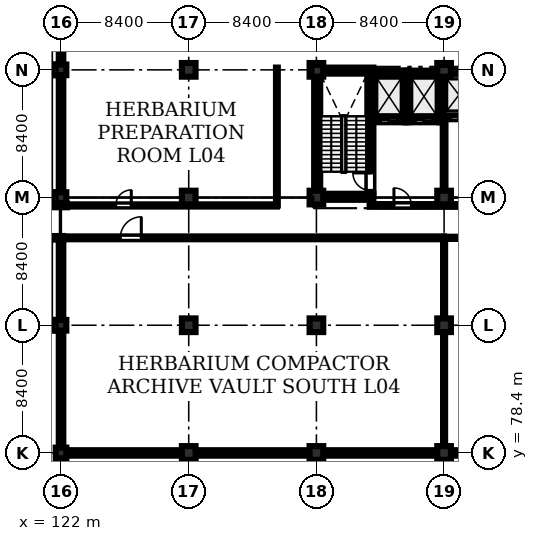
"""IFC4 building model, lengths in metres.
Left out: names, types, materials, properties, quantities, classifications, styles, units other than length and angle.
Written with IfcOpenShell. Run it as: python <this file> out.ifc"""

import sys

from ifc_helpers import new_model, si_unit, direction, frame, frame_2d, origin, origin_2d, place, context, subcontext, project, spatial, rectangle, extrude, element, fill, save


model = new_model("IFC4")
c1 = context("Model", 3, precision=1e-05, world=origin(), true_north=direction((0.0, 1.0)))
c2 = subcontext(c1, "Body", "Model", "MODEL_VIEW")
j1 = project(units=[si_unit("LENGTHUNIT", "METRE"), si_unit("PLANEANGLEUNIT", "RADIAN")], contexts=[c1])
p1 = place(None, origin())
s1 = spatial("IfcSite", under=j1, at=p1, CompositionType="ELEMENT")
p2 = place(p1, origin())
s2 = spatial("IfcBuilding", under=s1, at=p2, CompositionType="ELEMENT")
p3 = place(p2, frame((0.0, 0.0, 14.7)))
s3 = spatial("IfcBuildingStorey", under=s2, at=p3, CompositionType="ELEMENT", Elevation=14.7)
for number, where, z_axis, x_axis in (
    (1, (121.15, 86.8, 0.0), (0.0, 0.0, 1.0), (1.0, 0.0, 0.0)),
    (2, (121.15, 95.2, 0.0), (0.0, 0.0, 1.0), (1.0, 0.0, 0.0)),
    (3, (121.15, 103.6, 0.0), (0.0, 0.0, 1.0), (1.0, 0.0, 0.0)),
):
    element("IfcColumn", number, at=place(p3, frame(where, z_axis=z_axis, x_axis=x_axis)), inside=s3, PredefinedType="COLUMN", context=c2, shape_type="SweptSolid", body=[
        extrude(rectangle(XDim=0.7, YDim=0.7, at=origin_2d()), origin(), (0.0, 0.0, 1.0), 4.5),
    ])
for number, where, z_axis, x_axis in (
    (4, (122.0, 78.4, 0.0), (0.0, 0.0, 1.0), (1.0, 0.0, 0.0)),
    (5, (122.0, 86.8, 0.0), (0.0, 0.0, 1.0), (1.0, 0.0, 0.0)),
    (6, (122.0, 95.2, 0.0), (0.0, 0.0, 1.0), (1.0, 0.0, 0.0)),
    (7, (122.0, 103.6, 0.0), (0.0, 0.0, 1.0), (1.0, 0.0, 0.0)),
):
    element("IfcColumn", number, at=place(p3, frame(where, z_axis=z_axis, x_axis=x_axis)), inside=s3, PredefinedType="COLUMN", context=c2, shape_type="SweptSolid", body=[
        extrude(rectangle(XDim=0.7, YDim=0.7, at=origin_2d()), origin(), (0.0, 0.0, 1.0), 4.26),
    ])
for number, where, z_axis, x_axis in (
    (8, (130.4, 78.4, 0.0), (0.0, 0.0, 1.0), (1.0, 0.0, 0.0)),
    (9, (130.4, 86.8, 0.0), (0.0, 0.0, 1.0), (1.0, 0.0, 0.0)),
    (10, (130.4, 95.2, 0.0), (0.0, 0.0, 1.0), (1.0, 0.0, 0.0)),
    (11, (130.4, 103.6, 0.0), (0.0, 0.0, 1.0), (1.0, 0.0, 0.0)),
    (12, (138.8, 78.4, 0.0), (0.0, 0.0, 1.0), (1.0, 0.0, 0.0)),
    (13, (138.8, 86.8, 0.0), (0.0, 0.0, 1.0), (1.0, 0.0, 0.0)),
    (14, (138.8, 95.2, 0.0), (0.0, 0.0, 1.0), (1.0, 0.0, 0.0)),
    (15, (138.8, 103.6, 0.0), (0.0, 0.0, 1.0), (1.0, 0.0, 0.0)),
    (16, (147.2, 78.4, 0.0), (0.0, 0.0, 1.0), (1.0, 0.0, 0.0)),
    (17, (147.2, 86.8, 0.0), (0.0, 0.0, 1.0), (1.0, 0.0, 0.0)),
    (18, (147.2, 95.2, 0.0), (0.0, 0.0, 1.0), (1.0, 0.0, 0.0)),
    (19, (147.2, 103.6, 0.0), (0.0, 0.0, 1.0), (1.0, 0.0, 0.0)),
):
    element("IfcColumn", number, at=place(p3, frame(where, z_axis=z_axis, x_axis=x_axis)), inside=s3, PredefinedType="COLUMN", context=c2, shape_type="SweptSolid", body=[
        extrude(rectangle(XDim=0.9, YDim=0.9, at=origin_2d()), origin(), (0.0, 0.0, 1.0), 4.26),
    ])
for number, where, z_axis, x_axis in (
    (20, (138.65, 95.25, 0.0), (0.0, 0.0, 1.0), (1.0, 0.0, 0.0)),
    (21, (138.65, 103.55, 0.0), (0.0, 0.0, 1.0), (1.0, 0.0, 0.0)),
):
    element("IfcWall", number, at=place(p3, frame(where, z_axis=z_axis, x_axis=x_axis)), inside=s3, PredefinedType="SHEAR", context=c2, shape_type="SweptSolid", body=[
        extrude(rectangle(XDim=3.9, YDim=0.4, at=frame_2d((1.95, 0.0))), origin(), (0.0, 0.0, 1.0), 4.26),
    ])
p4 = place(p3, frame((138.85, 95.45, 0.0), z_axis=(0.0, 0.0, 1.0), x_axis=(0.0, 1.0, 0.0)))
e22 = element("IfcWall", 22, at=p4, inside=s3, PredefinedType="SHEAR", context=c2, shape_type="SweptSolid", body=[
    extrude(rectangle(XDim=7.9, YDim=0.4, at=frame_2d((3.95, 0.0))), origin(), (0.0, 0.0, 1.0), 4.26),
])
p5 = place(p3, frame((142.35, 95.45, 0.0), z_axis=(0.0, 0.0, 1.0), x_axis=(0.0, 1.0, 0.0)))
e23 = element("IfcWall", 23, at=p5, inside=s3, PredefinedType="SHEAR", context=c2, shape_type="SweptSolid", body=[
    extrude(rectangle(XDim=7.9, YDim=0.4, at=frame_2d((3.95, 0.0))), origin(), (0.0, 0.0, 1.0), 4.26),
])
p6 = place(p5, frame((0.22, 0.0, 0.0)))
e24 = element("IfcOpeningElement", 24, at=p6, cuts=e23, PredefinedType="OPENING", context=c2, shape_type="SweptSolid", body=[
    extrude(rectangle(XDim=1.15, YDim=2.15, at=frame_2d((0.575, 1.075))), frame((0.0, 0.21, 0.0), z_axis=(0.0, -1.0, 0.0), x_axis=(1.0, 0.0, 0.0)), (0.0, 0.0, 1.0), 0.42),
])
p7 = place(p3, frame((142.55, 100.275, 0.0), z_axis=(0.0, 0.0, 1.0), x_axis=(1.0, 0.0, 0.0)))
e25 = element("IfcWall", 25, at=p7, inside=s3, PredefinedType="SHEAR", context=c2, shape_type="SweptSolid", body=[
    extrude(rectangle(XDim=2.05, YDim=0.25, at=frame_2d((1.025, 0.0))), origin(), (0.0, 0.0, 1.0), 4.26),
])
p8 = place(p7, frame((0.475, 0.0, 0.0)))
e26 = element("IfcOpeningElement", 26, at=p8, cuts=e25, PredefinedType="OPENING", context=c2, shape_type="SweptSolid", body=[
    extrude(rectangle(XDim=1.1, YDim=2.15, at=frame_2d((0.55, 1.075))), frame((0.0, 0.135, 0.0), z_axis=(0.0, -1.0, 0.0), x_axis=(1.0, 0.0, 0.0)), (0.0, 0.0, 1.0), 0.27),
])
p9 = place(p3, frame((142.55, 103.425, 0.0), z_axis=(0.0, 0.0, 1.0), x_axis=(1.0, 0.0, 0.0)))
e27 = element("IfcWall", 27, at=p9, inside=s3, PredefinedType="SHEAR", context=c2, shape_type="SweptSolid", body=[
    extrude(rectangle(XDim=2.05, YDim=0.25, at=frame_2d((1.025, 0.0))), origin(), (0.0, 0.0, 1.0), 4.26),
])
p10 = place(p3, frame((144.725, 100.15, 0.0), z_axis=(0.0, 0.0, 1.0), x_axis=(0.0, 1.0, 0.0)))
e28 = element("IfcWall", 28, at=p10, inside=s3, PredefinedType="SHEAR", context=c2, shape_type="SweptSolid", body=[
    extrude(rectangle(XDim=3.4, YDim=0.25, at=frame_2d((1.7, 0.0))), origin(), (0.0, 0.0, 1.0), 4.26),
])
p11 = place(p3, frame((144.85, 100.275, 0.0), z_axis=(0.0, 0.0, 1.0), x_axis=(1.0, 0.0, 0.0)))
e29 = element("IfcWall", 29, at=p11, inside=s3, PredefinedType="SHEAR", context=c2, shape_type="SweptSolid", body=[
    extrude(rectangle(XDim=2.05, YDim=0.25, at=frame_2d((1.025, 0.0))), origin(), (0.0, 0.0, 1.0), 4.26),
])
p12 = place(p11, frame((0.465, 0.0, 0.0)))
e30 = element("IfcOpeningElement", 30, at=p12, cuts=e29, PredefinedType="OPENING", context=c2, shape_type="SweptSolid", body=[
    extrude(rectangle(XDim=1.12, YDim=2.15, at=frame_2d((0.56, 1.075))), frame((0.0, 0.135, 0.0), z_axis=(0.0, -1.0, 0.0), x_axis=(1.0, 0.0, 0.0)), (0.0, 0.0, 1.0), 0.27),
])
p13 = place(p3, frame((144.85, 103.425, 0.0), z_axis=(0.0, 0.0, 1.0), x_axis=(1.0, 0.0, 0.0)))
e31 = element("IfcWall", 31, at=p13, inside=s3, PredefinedType="SHEAR", context=c2, shape_type="SweptSolid", body=[
    extrude(rectangle(XDim=2.05, YDim=0.25, at=frame_2d((1.025, 0.0))), origin(), (0.0, 0.0, 1.0), 4.26),
])
p14 = place(p3, frame((147.025, 100.15, 0.0), z_axis=(0.0, 0.0, 1.0), x_axis=(0.0, 1.0, 0.0)))
e32 = element("IfcWall", 32, at=p14, inside=s3, PredefinedType="SHEAR", context=c2, shape_type="SweptSolid", body=[
    extrude(rectangle(XDim=3.4, YDim=0.25, at=frame_2d((1.7, 0.0))), origin(), (0.0, 0.0, 1.0), 4.26),
])
p15 = place(p3, frame((147.15, 100.475, 0.0), z_axis=(0.0, 0.0, 1.0), x_axis=(1.0, 0.0, 0.0)))
e33 = element("IfcWall", 33, at=p15, inside=s3, PredefinedType="SHEAR", context=c2, shape_type="SweptSolid", body=[
    extrude(rectangle(XDim=2.05, YDim=0.25, at=frame_2d((1.025, 0.0))), origin(), (0.0, 0.0, 1.0), 4.26),
])
p16 = place(p15, frame((0.495, 0.0, 0.0)))
e34 = element("IfcOpeningElement", 34, at=p16, cuts=e33, PredefinedType="OPENING", context=c2, shape_type="SweptSolid", body=[
    extrude(rectangle(XDim=1.06, YDim=2.15, at=frame_2d((0.53, 1.075))), frame((0.0, 0.135, 0.0), z_axis=(0.0, -1.0, 0.0), x_axis=(1.0, 0.0, 0.0)), (0.0, 0.0, 1.0), 0.27),
])
p17 = place(p3, frame((147.15, 103.425, 0.0), z_axis=(0.0, 0.0, 1.0), x_axis=(1.0, 0.0, 0.0)))
e35 = element("IfcWall", 35, at=p17, inside=s3, PredefinedType="SHEAR", context=c2, shape_type="SweptSolid", body=[
    extrude(rectangle(XDim=2.05, YDim=0.25, at=frame_2d((1.025, 0.0))), origin(), (0.0, 0.0, 1.0), 4.26),
])
p18 = place(p3, frame((129.95, 78.4, 0.0), z_axis=(0.0, 0.0, 1.0), x_axis=(-1.0, 0.0, 0.0)))
e36 = element("IfcWall", 36, at=p18, inside=s3, PredefinedType="STANDARD", context=c2, shape_type="SweptSolid", body=[
    extrude(rectangle(XDim=7.6, YDim=0.36, at=frame_2d((3.8, 0.0))), origin(), (0.0, 0.0, 1.0), 3.56),
])
p19 = place(p18, frame((1.15, 0.0, 0.95)))
e37 = element("IfcOpeningElement", 37, at=p19, cuts=e36, PredefinedType="OPENING", context=c2, shape_type="SweptSolid", body=[
    extrude(rectangle(XDim=1.5, YDim=1.5, at=frame_2d((0.75, 0.75))), frame((0.0, 0.19, 0.0), z_axis=(0.0, -1.0, 0.0), x_axis=(1.0, 0.0, 0.0)), (0.0, 0.0, 1.0), 0.38),
])
p20 = place(p3, frame((138.35, 78.4, 0.0), z_axis=(0.0, 0.0, 1.0), x_axis=(-1.0, 0.0, 0.0)))
e38 = element("IfcWall", 38, at=p20, inside=s3, PredefinedType="STANDARD", context=c2, shape_type="SweptSolid", body=[
    extrude(rectangle(XDim=7.5, YDim=0.36, at=frame_2d((3.75, 0.0))), origin(), (0.0, 0.0, 1.0), 3.56),
])
p21 = place(p20, frame((1.15, 0.0, 0.95)))
e39 = element("IfcOpeningElement", 39, at=p21, cuts=e38, PredefinedType="OPENING", context=c2, shape_type="SweptSolid", body=[
    extrude(rectangle(XDim=1.5, YDim=1.5, at=frame_2d((0.75, 0.75))), frame((0.0, 0.19, 0.0), z_axis=(0.0, -1.0, 0.0), x_axis=(1.0, 0.0, 0.0)), (0.0, 0.0, 1.0), 0.38),
])
p22 = place(p3, frame((146.75, 78.4, 0.0), z_axis=(0.0, 0.0, 1.0), x_axis=(-1.0, 0.0, 0.0)))
e40 = element("IfcWall", 40, at=p22, inside=s3, PredefinedType="STANDARD", context=c2, shape_type="SweptSolid", body=[
    extrude(rectangle(XDim=7.5, YDim=0.36, at=frame_2d((3.75, 0.0))), origin(), (0.0, 0.0, 1.0), 3.56),
])
p23 = place(p22, frame((1.15, 0.0, 0.95)))
e41 = element("IfcOpeningElement", 41, at=p23, cuts=e40, PredefinedType="OPENING", context=c2, shape_type="SweptSolid", body=[
    extrude(rectangle(XDim=1.5, YDim=1.5, at=frame_2d((0.75, 0.75))), frame((0.0, 0.19, 0.0), z_axis=(0.0, -1.0, 0.0), x_axis=(1.0, 0.0, 0.0)), (0.0, 0.0, 1.0), 0.38),
])
p24 = place(p3, frame((155.15, 78.4, 0.0), z_axis=(0.0, 0.0, 1.0), x_axis=(-1.0, 0.0, 0.0)))
e42 = element("IfcWall", 42, at=p24, inside=s3, PredefinedType="STANDARD", context=c2, shape_type="SweptSolid", body=[
    extrude(rectangle(XDim=7.5, YDim=0.36, at=frame_2d((3.75, 0.0))), origin(), (0.0, 0.0, 1.0), 3.56),
])
p25 = place(p24, frame((1.15, 0.0, 0.95)))
e43 = element("IfcOpeningElement", 43, at=p25, cuts=e42, PredefinedType="OPENING", context=c2, shape_type="SweptSolid", body=[
    extrude(rectangle(XDim=1.5, YDim=1.5, at=frame_2d((0.75, 0.75))), frame((0.0, 0.19, 0.0), z_axis=(0.0, -1.0, 0.0), x_axis=(1.0, 0.0, 0.0)), (0.0, 0.0, 1.0), 0.38),
])
p26 = place(p3, frame((122.0, 78.75, 0.0), z_axis=(0.0, 0.0, 1.0), x_axis=(0.0, 1.0, 0.0)))
e44 = element("IfcWall", 44, at=p26, inside=s3, PredefinedType="STANDARD", context=c2, shape_type="SweptSolid", body=[
    extrude(rectangle(XDim=7.7, YDim=0.3, at=frame_2d((3.85, 0.0))), origin(), (0.0, 0.0, 1.0), 3.51),
])
p27 = place(p3, frame((122.0, 87.15, 0.0), z_axis=(0.0, 0.0, 1.0), x_axis=(0.0, 1.0, 0.0)))
e45 = element("IfcWall", 45, at=p27, inside=s3, PredefinedType="STANDARD", context=c2, shape_type="SweptSolid", body=[
    extrude(rectangle(XDim=5.27, YDim=0.3, at=frame_2d((2.635, 0.0))), origin(), (0.0, 0.0, 1.0), 3.51),
])
p28 = place(p3, frame((122.14, 92.55, 0.0), z_axis=(0.0, 0.0, 1.0), x_axis=(-1.0, 0.0, 0.0)))
e46 = element("IfcWall", 46, at=p28, inside=s3, PredefinedType="STANDARD", context=c2, shape_type="SweptSolid", body=[
    extrude(rectangle(XDim=1.11, YDim=0.24, at=frame_2d((0.555, 0.0))), origin(), (0.0, 0.0, 1.0), 4.26),
])
p29 = place(p3, frame((121.03, 94.68, 0.0), z_axis=(0.0, 0.0, 1.0), x_axis=(1.0, 0.0, 0.0)))
e47 = element("IfcWall", 47, at=p29, inside=s3, PredefinedType="STANDARD", context=c2, shape_type="SweptSolid", body=[
    extrude(rectangle(XDim=1.36, YDim=0.24, at=frame_2d((0.68, 0.0))), origin(), (0.0, 0.0, 1.0), 4.26),
])
p30 = place(p3, frame((122.0, 95.55, 0.0), z_axis=(0.0, 0.0, 1.0), x_axis=(0.0, 1.0, 0.0)))
e48 = element("IfcWall", 48, at=p30, inside=s3, PredefinedType="STANDARD", context=c2, shape_type="SweptSolid", body=[
    extrude(rectangle(XDim=7.7, YDim=0.3, at=frame_2d((3.85, 0.0))), origin(), (0.0, 0.0, 1.0), 3.51),
])
p31 = place(p3, frame((122.0, 103.95, 0.0), z_axis=(0.0, 0.0, 1.0), x_axis=(0.0, 1.0, 0.0)))
e49 = element("IfcWall", 49, at=p31, inside=s3, PredefinedType="STANDARD", context=c2, shape_type="SweptSolid", body=[
    extrude(rectangle(XDim=7.15, YDim=0.3, at=frame_2d((3.575, 0.0))), origin(), (0.0, 0.0, 1.0), 3.51),
])
p32 = place(p3, frame((142.3, 94.68, 0.0), z_axis=(0.0, 0.0, 1.0), x_axis=(1.0, 0.0, 0.0)))
e50 = element("IfcWall", 50, at=p32, inside=s3, PredefinedType="STANDARD", context=c2, shape_type="SweptSolid", body=[
    extrude(rectangle(XDim=4.8, YDim=0.18, at=frame_2d((2.4, 0.0))), origin(), (0.0, 0.0, 1.0), 4.26),
])
p33 = place(p32, frame((1.6, 0.0, 0.0)))
e51 = element("IfcOpeningElement", 51, at=p33, cuts=e50, PredefinedType="OPENING", context=c2, shape_type="SweptSolid", body=[
    extrude(rectangle(XDim=1.15, YDim=2.15, at=frame_2d((0.575, 1.075))), frame((0.0, 0.1, 0.0), z_axis=(0.0, -1.0, 0.0), x_axis=(1.0, 0.0, 0.0)), (0.0, 0.0, 1.0), 0.2),
])
p34 = place(p3, frame((147.3, 94.68, 0.0), z_axis=(0.0, 0.0, 1.0), x_axis=(1.0, 0.0, 0.0)))
e52 = element("IfcWall", 52, at=p34, inside=s3, PredefinedType="STANDARD", context=c2, shape_type="SweptSolid", body=[
    extrude(rectangle(XDim=4.85, YDim=0.18, at=frame_2d((2.425, 0.0))), origin(), (0.0, 0.0, 1.0), 4.26),
])
p35 = place(p34, frame((1.6, 0.0, 0.0)))
e53 = element("IfcOpeningElement", 53, at=p35, cuts=e52, PredefinedType="OPENING", context=c2, shape_type="SweptSolid", body=[
    extrude(rectangle(XDim=1.15, YDim=2.15, at=frame_2d((0.575, 1.075))), frame((0.0, 0.1, 0.0), z_axis=(0.0, -1.0, 0.0), x_axis=(1.0, 0.0, 0.0)), (0.0, 0.0, 1.0), 0.2),
])
p36 = place(p3, frame((147.2, 95.75, 0.0), z_axis=(0.0, 0.0, 1.0), x_axis=(0.0, 1.0, 0.0)))
e54 = element("IfcWall", 54, at=p36, inside=s3, PredefinedType="STANDARD", context=c2, shape_type="SweptSolid", body=[
    extrude(rectangle(XDim=4.5, YDim=0.18, at=frame_2d((2.25, 0.0))), origin(), (0.0, 0.0, 1.0), 3.51),
])
p37 = place(p3, frame((136.2, 94.68, 0.0), z_axis=(0.0, 0.0, 1.0), x_axis=(0.0, 1.0, 0.0)))
e55 = element("IfcWall", 55, at=p37, inside=s3, PredefinedType="PARTITIONING", context=c2, shape_type="SweptSolid", body=[
    extrude(rectangle(XDim=9.07, YDim=0.12, at=frame_2d((4.535, 0.0))), origin(), (0.0, 0.0, 1.0), 4.26),
])
p38 = place(p3, frame((122.4, 94.68, 0.0), z_axis=(0.0, 0.0, 1.0), x_axis=(1.0, 0.0, 0.0)))
e56 = element("IfcWall", 56, at=p38, inside=s3, PredefinedType="PARTITIONING", context=c2, shape_type="SweptSolid", body=[
    extrude(rectangle(XDim=13.8, YDim=0.145, at=frame_2d((6.9, 0.0))), origin(), (0.0, 0.0, 1.0), 4.26),
])
p39 = place(p38, frame((3.2, 0.0, 0.0)))
e57 = element("IfcOpeningElement", 57, at=p39, cuts=e56, PredefinedType="OPENING", context=c2, shape_type="SweptSolid", body=[
    extrude(rectangle(XDim=1.02, YDim=2.15, at=frame_2d((0.51, 1.075))), frame((0.0, 0.083, 0.0), z_axis=(0.0, -1.0, 0.0), x_axis=(1.0, 0.0, 0.0)), (0.0, 0.0, 1.0), 0.165),
])
p40 = place(p3, frame((122.15, 92.55, 0.0), z_axis=(0.0, 0.0, 1.0), x_axis=(1.0, 0.0, 0.0)))
e58 = element("IfcWall", 58, at=p40, inside=s3, PredefinedType="SOLIDWALL", context=c2, shape_type="SweptSolid", body=[
    extrude(rectangle(XDim=25.05, YDim=0.19, at=frame_2d((12.525, 0.0))), origin(), (0.0, 0.0, 1.0), 4.26),
])
p41 = place(p40, frame((3.75, 0.0, 0.0)))
e59 = element("IfcOpeningElement", 59, at=p41, cuts=e58, PredefinedType="OPENING", context=c2, shape_type="SweptSolid", body=[
    extrude(rectangle(XDim=1.38, YDim=2.22, at=frame_2d((0.69, 1.11))), frame((0.0, 0.105, 0.0), z_axis=(0.0, -1.0, 0.0), x_axis=(1.0, 0.0, 0.0)), (0.0, 0.0, 1.0), 0.21),
])
p42 = place(p3, frame((147.2, 92.55, 0.0), z_axis=(0.0, 0.0, 1.0), x_axis=(1.0, 0.0, 0.0)))
e60 = element("IfcWall", 60, at=p42, inside=s3, PredefinedType="PARTITIONING", context=c2, shape_type="SweptSolid", body=[
    extrude(rectangle(XDim=8.4, YDim=0.145, at=frame_2d((4.2, 0.0))), origin(), (0.0, 0.0, 1.0), 4.26),
])
p43 = place(p42, frame((3.4, 0.0, 0.0)))
e61 = element("IfcOpeningElement", 61, at=p43, cuts=e60, PredefinedType="OPENING", context=c2, shape_type="SweptSolid", body=[
    extrude(rectangle(XDim=1.02, YDim=2.15, at=frame_2d((0.51, 1.075))), frame((0.0, 0.083, 0.0), z_axis=(0.0, -1.0, 0.0), x_axis=(1.0, 0.0, 0.0)), (0.0, 0.0, 1.0), 0.165),
])
p44 = place(p3, frame((147.2, 78.55, 0.0), z_axis=(0.0, 0.0, 1.0), x_axis=(0.0, 1.0, 0.0)))
e62 = element("IfcWall", 62, at=p44, inside=s3, PredefinedType="PARTITIONING", context=c2, shape_type="SweptSolid", body=[
    extrude(rectangle(XDim=14.0, YDim=0.135, at=frame_2d((7.0, 0.0))), origin(), (0.0, 0.0, 1.0), 3.51),
])
p45 = place(p19, origin())
e63 = element("IfcWindow", 63, at=p45, inside=s3, PartitioningType="DOUBLE_PANEL_VERTICAL", PredefinedType="WINDOW", context=c2, shape_type="SweptSolid", body=[
    extrude(rectangle(XDim=1.5, YDim=1.5, at=frame_2d((0.75, 0.75))), frame((0.0, 0.03, 0.0), z_axis=(0.0, -1.0, 0.0), x_axis=(1.0, 0.0, 0.0)), (0.0, 0.0, 1.0), 0.06),
])
fill(e37, e63)
p46 = place(p21, origin())
e64 = element("IfcWindow", 64, at=p46, inside=s3, PartitioningType="DOUBLE_PANEL_VERTICAL", PredefinedType="WINDOW", context=c2, shape_type="SweptSolid", body=[
    extrude(rectangle(XDim=1.5, YDim=1.5, at=frame_2d((0.75, 0.75))), frame((0.0, 0.03, 0.0), z_axis=(0.0, -1.0, 0.0), x_axis=(1.0, 0.0, 0.0)), (0.0, 0.0, 1.0), 0.06),
])
fill(e39, e64)
p47 = place(p23, origin())
e65 = element("IfcWindow", 65, at=p47, inside=s3, PartitioningType="DOUBLE_PANEL_VERTICAL", PredefinedType="WINDOW", context=c2, shape_type="SweptSolid", body=[
    extrude(rectangle(XDim=1.5, YDim=1.5, at=frame_2d((0.75, 0.75))), frame((0.0, 0.03, 0.0), z_axis=(0.0, -1.0, 0.0), x_axis=(1.0, 0.0, 0.0)), (0.0, 0.0, 1.0), 0.06),
])
fill(e41, e65)
p48 = place(p33, origin())
e66 = element("IfcDoor", 66, at=p48, inside=s3, OperationType="SINGLE_SWING_LEFT", PredefinedType="DOOR", context=c2, shape_type="SweptSolid", body=[
    extrude(rectangle(XDim=1.15, YDim=2.15, at=frame_2d((0.575, 1.075))), frame((0.0, 0.025, 0.0), z_axis=(0.0, -1.0, 0.0), x_axis=(1.0, 0.0, 0.0)), (0.0, 0.0, 1.0), 0.05),
])
fill(e51, e66)
p49 = place(p39, origin())
e67 = element("IfcDoor", 67, at=p49, inside=s3, OperationType="SINGLE_SWING_RIGHT", PredefinedType="DOOR", context=c2, shape_type="SweptSolid", body=[
    extrude(rectangle(XDim=1.02, YDim=2.15, at=frame_2d((0.51, 1.075))), frame((0.0, 0.025, 0.0), z_axis=(0.0, -1.0, 0.0), x_axis=(1.0, 0.0, 0.0)), (0.0, 0.0, 1.0), 0.05),
])
fill(e57, e67)
p50 = place(p41, origin())
e68 = element("IfcDoor", 68, at=p50, inside=s3, OperationType="SINGLE_SWING_RIGHT", PredefinedType="DOOR", context=c2, shape_type="SweptSolid", body=[
    extrude(rectangle(XDim=1.38, YDim=2.22, at=frame_2d((0.69, 1.11))), frame((0.0, 0.025, 0.0), z_axis=(0.0, -1.0, 0.0), x_axis=(1.0, 0.0, 0.0)), (0.0, 0.0, 1.0), 0.05),
])
fill(e59, e68)
p51 = place(p6, origin())
e69 = element("IfcDoor", 69, at=p51, inside=s3, OperationType="SINGLE_SWING_RIGHT", PredefinedType="DOOR", context=c2, shape_type="SweptSolid", body=[
    extrude(rectangle(XDim=1.15, YDim=2.15, at=frame_2d((0.575, 1.075))), frame((0.0, 0.025, 0.0), z_axis=(0.0, -1.0, 0.0), x_axis=(1.0, 0.0, 0.0)), (0.0, 0.0, 1.0), 0.05),
])
fill(e24, e69)
p52 = place(p8, origin())
e70 = element("IfcDoor", 70, at=p52, inside=s3, OperationType="SLIDING_TO_LEFT", PredefinedType="DOOR", context=c2, shape_type="SweptSolid", body=[
    extrude(rectangle(XDim=1.1, YDim=2.15, at=frame_2d((0.55, 1.075))), frame((0.0, 0.025, 0.0), z_axis=(0.0, -1.0, 0.0), x_axis=(1.0, 0.0, 0.0)), (0.0, 0.0, 1.0), 0.05),
])
fill(e26, e70)
p53 = place(p12, origin())
e71 = element("IfcDoor", 71, at=p53, inside=s3, OperationType="SLIDING_TO_LEFT", PredefinedType="DOOR", context=c2, shape_type="SweptSolid", body=[
    extrude(rectangle(XDim=1.12, YDim=2.15, at=frame_2d((0.56, 1.075))), frame((0.0, 0.025, 0.0), z_axis=(0.0, -1.0, 0.0), x_axis=(1.0, 0.0, 0.0)), (0.0, 0.0, 1.0), 0.05),
])
fill(e30, e71)
p54 = place(p16, origin())
e72 = element("IfcDoor", 72, at=p54, inside=s3, OperationType="SLIDING_TO_LEFT", PredefinedType="DOOR", context=c2, shape_type="SweptSolid", body=[
    extrude(rectangle(XDim=1.06, YDim=2.15, at=frame_2d((0.53, 1.075))), frame((0.0, 0.025, 0.0), z_axis=(0.0, -1.0, 0.0), x_axis=(1.0, 0.0, 0.0)), (0.0, 0.0, 1.0), 0.05),
])
fill(e34, e72)
save(model, sys.argv[1])
